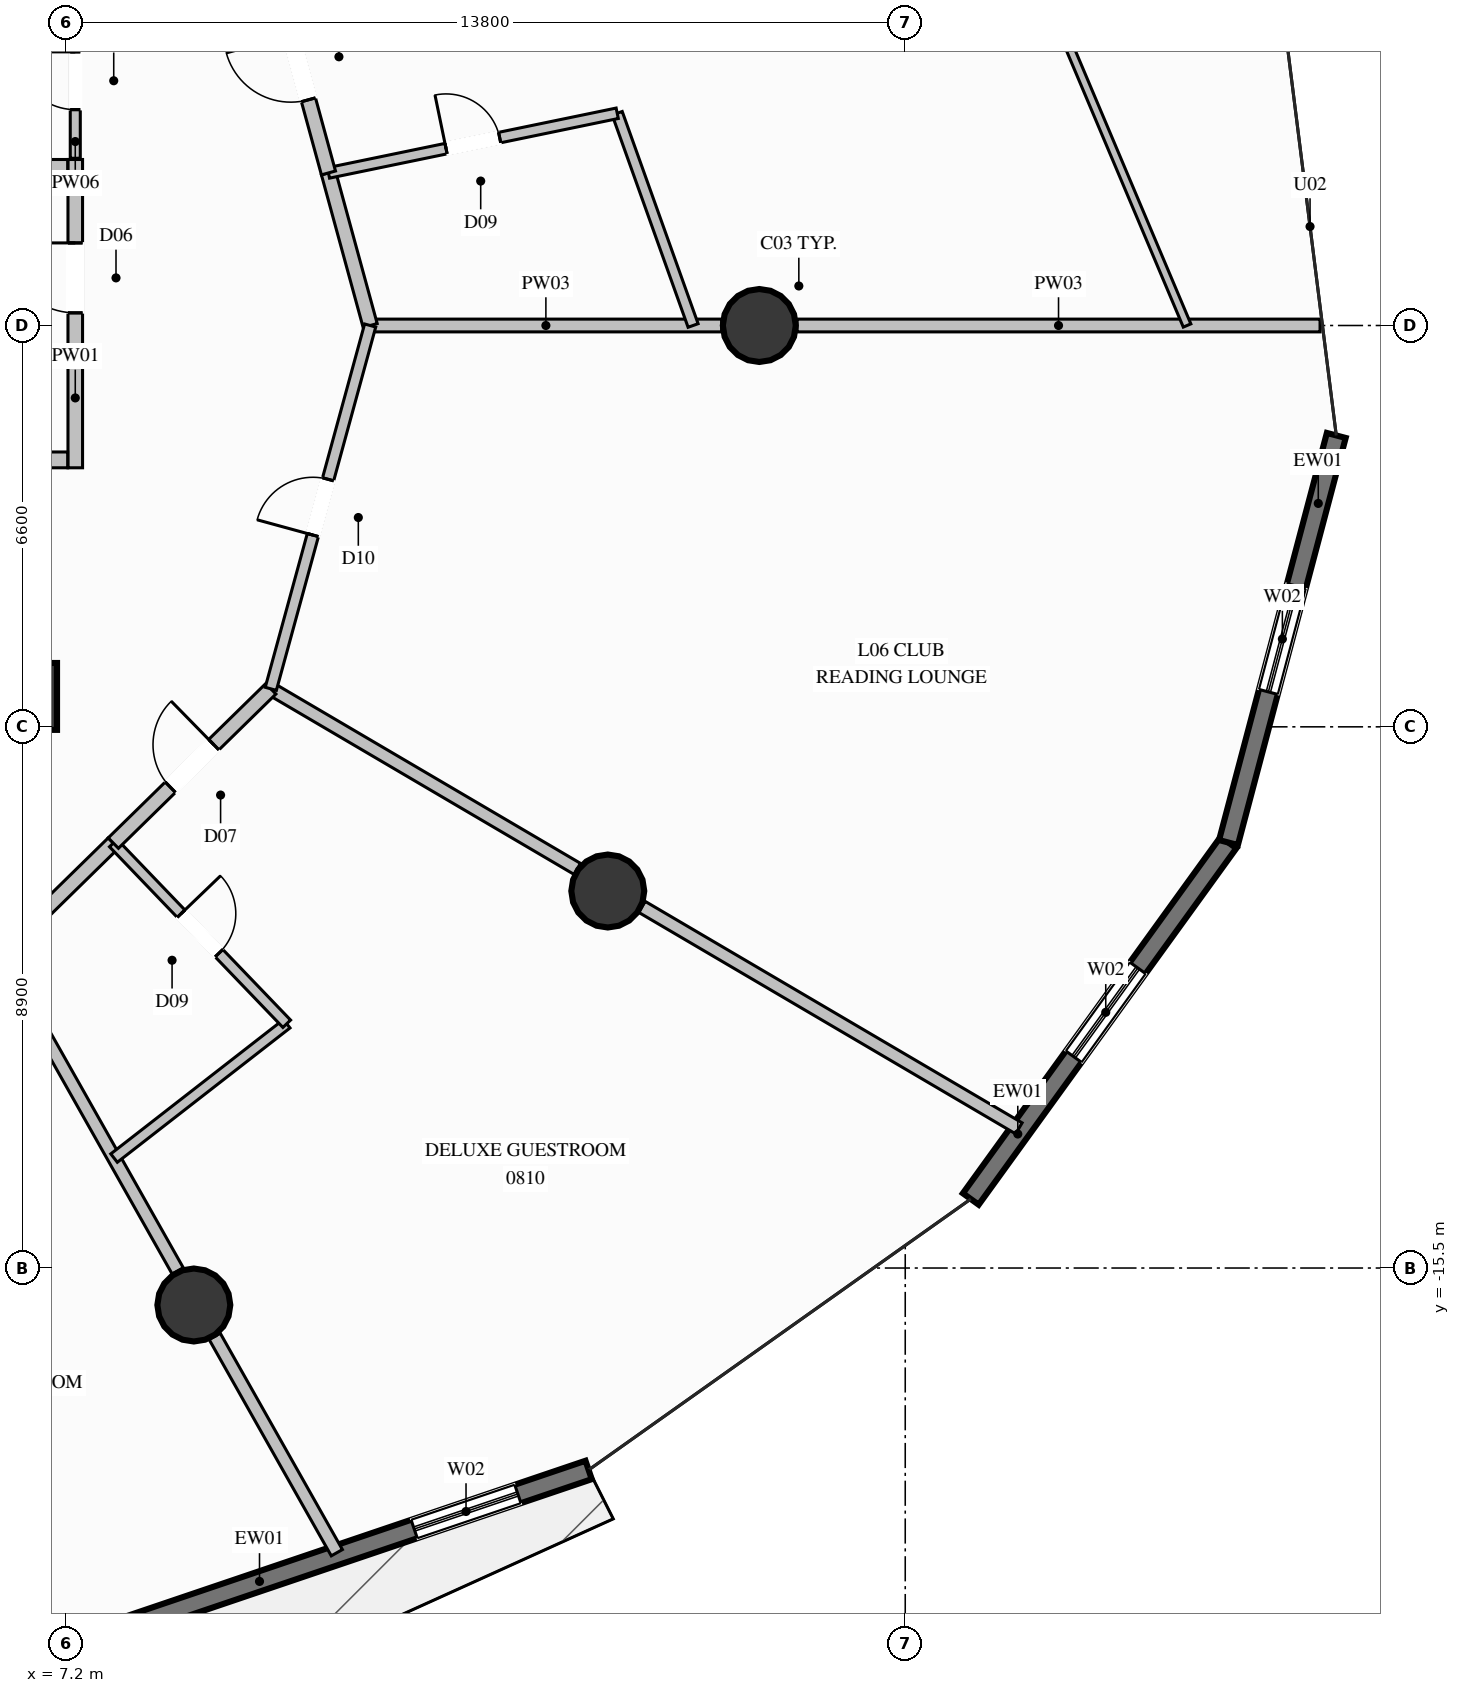
"""IFC4 building model, lengths in metres.
Left out: names, types, materials, properties, quantities, classifications, styles, units other than length and angle.
Written with IfcOpenShell. Run it as: python <this file> out.ifc"""

import sys

from ifc_helpers import new_model, si_unit, direction, frame, frame_2d, origin, origin_2d, place, context, subcontext, project, spatial, rectangle, circle, extrude, element, fill, save


model = new_model("IFC4")
c1 = context("Model", 3, precision=1e-05, world=origin(), true_north=direction((0.0, 1.0)))
c2 = subcontext(c1, "Body", "Model", "MODEL_VIEW")
j1 = project(units=[si_unit("LENGTHUNIT", "METRE"), si_unit("PLANEANGLEUNIT", "RADIAN")], contexts=[c1])
p1 = place(None, origin())
s1 = spatial("IfcSite", under=j1, at=p1, CompositionType="ELEMENT")
p2 = place(p1, origin())
s2 = spatial("IfcBuilding", under=s1, at=p2, CompositionType="ELEMENT")
p3 = place(p2, frame((0.0, 0.0, 32.0)))
s3 = spatial("IfcBuildingStorey", under=s2, at=p3, CompositionType="ELEMENT", Elevation=32.0)
p4 = place(p3, frame((6.5, -6.1, 0.0), z_axis=(0.0, 0.0, 1.0), x_axis=(1.0, 0.0, 0.0)))
e1 = element("IfcColumn", 1, at=p4, inside=s3, PredefinedType="COLUMN", context=c2, shape_type="SweptSolid", body=[
    extrude(rectangle(XDim=1.1, YDim=1.1, at=origin_2d()), origin(), (0.0, 0.0, 1.0), 3.6),
])
for number, where, z_axis, x_axis in (
    (2, (18.6, 0.0, 0.0), (0.0, 0.0, 1.0), (1.0, 0.0, 0.0)),
    (3, (9.3, -16.108, 0.0), (0.0, 0.0, 1.0), (1.0, 0.0, 0.0)),
    (4, (16.108, -9.3, 0.0), (0.0, 0.0, 1.0), (1.0, 0.0, 0.0)),
):
    element("IfcColumn", number, at=place(p3, frame(where, z_axis=z_axis, x_axis=x_axis)), inside=s3, PredefinedType="COLUMN", context=c2, shape_type="SweptSolid", body=[
        extrude(circle(Radius=0.6, at=origin_2d()), origin(), (0.0, 0.0, 1.0), 3.6),
    ])
p5 = place(p3, frame((15.793, -18.821, 0.0), z_axis=(0.0, 0.0, 1.0), x_axis=(-0.94717495877, -0.320717317085, 0.0)))
e5 = element("IfcWall", 5, at=p5, inside=s3, PredefinedType="SOLIDWALL", context=c2, shape_type="SweptSolid", body=[
    extrude(rectangle(XDim=8.151, YDim=0.32, at=frame_2d((4.075, 0.0))), origin(), (0.0, 0.0, 1.0), 3.34),
])
p6 = place(p5, frame((1.229, 0.0, 0.35)))
e6 = element("IfcOpeningElement", 6, at=p6, cuts=e5, PredefinedType="OPENING", context=c2, shape_type="SweptSolid", body=[
    extrude(rectangle(XDim=1.8, YDim=2.6, at=frame_2d((0.9, 1.3))), frame((0.0, 0.17, 0.0), z_axis=(0.0, -1.0, 0.0), x_axis=(1.0, 0.0, 0.0)), (0.0, 0.0, 1.0), 0.34),
])
p7 = place(p3, frame((26.316, -8.503, 0.0), z_axis=(0.0, 0.0, 1.0), x_axis=(-0.585883584877, -0.810395227634, 0.0)))
e7 = element("IfcWall", 7, at=p7, inside=s3, PredefinedType="SOLIDWALL", context=c2, shape_type="SweptSolid", body=[
    extrude(rectangle(XDim=7.234, YDim=0.32, at=frame_2d((3.617, 0.0))), origin(), (0.0, 0.0, 1.0), 3.34),
])
p8 = place(p7, frame((2.545, 0.0, 0.35)))
e8 = element("IfcOpeningElement", 8, at=p8, cuts=e7, PredefinedType="OPENING", context=c2, shape_type="SweptSolid", body=[
    extrude(rectangle(XDim=1.8, YDim=2.6, at=frame_2d((0.9, 1.3))), frame((0.0, 0.17, 0.0), z_axis=(0.0, -1.0, 0.0), x_axis=(1.0, 0.0, 0.0)), (0.0, 0.0, 1.0), 0.34),
])
p9 = place(p3, frame((28.089, -1.808, 0.0), z_axis=(0.0, 0.0, 1.0), x_axis=(-0.256032082016, -0.966668284873, 0.0)))
e9 = element("IfcWall", 9, at=p9, inside=s3, PredefinedType="SOLIDWALL", context=c2, shape_type="SweptSolid", body=[
    extrude(rectangle(XDim=6.926, YDim=0.32, at=frame_2d((3.463, 0.0))), origin(), (0.0, 0.0, 1.0), 3.34),
])
p10 = place(p9, frame((2.563, 0.0, 0.35)))
e10 = element("IfcOpeningElement", 10, at=p10, cuts=e9, PredefinedType="OPENING", context=c2, shape_type="SweptSolid", body=[
    extrude(rectangle(XDim=1.8, YDim=2.6, at=frame_2d((0.9, 1.3))), frame((0.0, 0.17, 0.0), z_axis=(0.0, -1.0, 0.0), x_axis=(1.0, 0.0, 0.0)), (0.0, 0.0, 1.0), 0.34),
])
p11 = place(p3, frame((7.35, -2.34, 0.0), z_axis=(0.0, 0.0, 1.0), x_axis=(0.0, 1.0, 0.0)))
e11 = element("IfcWall", 11, at=p11, inside=s3, PredefinedType="PARTITIONING", context=c2, shape_type="SweptSolid", body=[
    extrude(rectangle(XDim=5.07, YDim=0.24, at=frame_2d((2.535, 0.0))), origin(), (0.0, 0.0, 1.0), 2.425),
])
p12 = place(p11, frame((2.548, 0.0, 0.0)))
e12 = element("IfcOpeningElement", 12, at=p12, cuts=e11, PredefinedType="OPENING", context=c2, shape_type="SweptSolid", body=[
    extrude(rectangle(XDim=1.15, YDim=2.2, at=frame_2d((0.575, 1.1))), frame((0.0, 0.13, 0.0), z_axis=(0.0, -1.0, 0.0), x_axis=(1.0, 0.0, 0.0)), (0.0, 0.0, 1.0), 0.26),
])
p13 = place(p3, frame((6.35, -2.21, 0.0), z_axis=(0.0, 0.0, 1.0), x_axis=(1.0, 0.0, 0.0)))
e13 = element("IfcWall", 13, at=p13, inside=s3, PredefinedType="PARTITIONING", context=c2, shape_type="SweptSolid", body=[
    extrude(rectangle(XDim=0.875, YDim=0.26, at=frame_2d((0.438, 0.0))), origin(), (0.0, 0.0, 1.0), 3.34),
])
p14 = place(p3, frame((4.13, 2.6, 0.0), z_axis=(0.0, 0.0, 1.0), x_axis=(1.0, 0.0, 0.0)))
e14 = element("IfcWall", 14, at=p14, inside=s3, PredefinedType="PARTITIONING", context=c2, shape_type="SweptSolid", body=[
    extrude(rectangle(XDim=3.095, YDim=0.26, at=frame_2d((1.548, 0.0))), origin(), (0.0, 0.0, 1.0), 3.34),
])
p15 = place(p3, frame((7.35, 2.75, 0.0), z_axis=(0.0, 0.0, 1.0), x_axis=(0.0, 1.0, 0.0)))
e15 = element("IfcWall", 15, at=p15, inside=s3, PredefinedType="PARTITIONING", context=c2, shape_type="SweptSolid", body=[
    extrude(rectangle(XDim=2.55, YDim=0.165, at=frame_2d((1.275, 0.0))), origin(), (0.0, 0.0, 1.0), 3.34),
])
p16 = place(p15, frame((0.8, 0.0, 0.0)))
e16 = element("IfcOpeningElement", 16, at=p16, cuts=e15, PredefinedType="OPENING", context=c2, shape_type="SweptSolid", body=[
    extrude(rectangle(XDim=0.95, YDim=2.1, at=frame_2d((0.475, 1.05))), frame((0.0, 0.093, 0.0), z_axis=(0.0, -1.0, 0.0), x_axis=(1.0, 0.0, 0.0)), (0.0, 0.0, 1.0), 0.185),
])
p17 = place(p3, frame((12.2, 0.0, 0.0), z_axis=(0.0, 0.0, 1.0), x_axis=(1.0, 0.0, 0.0)))
e17 = element("IfcWall", 17, at=p17, inside=s3, PredefinedType="PARTITIONING", context=c2, shape_type="SweptSolid", body=[
    extrude(rectangle(XDim=5.78, YDim=0.21, at=frame_2d((2.89, 0.0))), origin(), (0.0, 0.0, 1.0), 2.709),
])
p18 = place(p3, frame((19.22, 0.0, 0.0), z_axis=(0.0, 0.0, 1.0), x_axis=(1.0, 0.0, 0.0)))
e18 = element("IfcWall", 18, at=p18, inside=s3, PredefinedType="PARTITIONING", context=c2, shape_type="SweptSolid", body=[
    extrude(rectangle(XDim=8.602, YDim=0.21, at=frame_2d((4.301, 0.0))), origin(), (0.0, 0.0, 1.0), 3.34),
])
p19 = place(p3, frame((6.1, -10.349, 0.0), z_axis=(0.0, 0.0, 1.0), x_axis=(0.491652896219, -0.870791266401, 0.0)))
e19 = element("IfcWall", 19, at=p19, inside=s3, PredefinedType="PARTITIONING", context=c2, shape_type="SweptSolid", body=[
    extrude(rectangle(XDim=5.969, YDim=0.21, at=frame_2d((2.985, 0.0))), origin(), (0.0, 0.0, 1.0), 2.709),
])
p20 = place(p3, frame((9.643, -16.624, 0.0), z_axis=(0.0, 0.0, 1.0), x_axis=(0.491698874435, -0.87076530528, 0.0)))
e20 = element("IfcWall", 20, at=p20, inside=s3, PredefinedType="PARTITIONING", context=c2, shape_type="SweptSolid", body=[
    extrude(rectangle(XDim=4.086, YDim=0.21, at=frame_2d((2.043, 0.0))), origin(), (0.0, 0.0, 1.0), 3.34),
])
p21 = place(p3, frame((10.566, -5.975, 0.0), z_axis=(0.0, 0.0, 1.0), x_axis=(0.862217531027, -0.506538181374, 0.0)))
e21 = element("IfcWall", 21, at=p21, inside=s3, PredefinedType="PARTITIONING", context=c2, shape_type="SweptSolid", body=[
    extrude(rectangle(XDim=5.845, YDim=0.21, at=frame_2d((2.923, 0.0))), origin(), (0.0, 0.0, 1.0), 2.709),
])
p22 = place(p3, frame((16.67, -9.561, 0.0), z_axis=(0.0, 0.0, 1.0), x_axis=(0.862214298177, -0.506543684215, 0.0)))
e22 = element("IfcWall", 22, at=p22, inside=s3, PredefinedType="PARTITIONING", context=c2, shape_type="SweptSolid", body=[
    extrude(rectangle(XDim=7.19, YDim=0.21, at=frame_2d((3.595, 0.0))), origin(), (0.0, 0.0, 1.0), 3.34),
])
p23 = place(p3, frame((12.2, 0.0, 0.0), z_axis=(0.0, 0.0, 1.0), x_axis=(-0.263744763784, 0.964592504416, 0.0)))
e23 = element("IfcWall", 23, at=p23, inside=s3, PredefinedType="PARTITIONING", context=c2, shape_type="SweptSolid", body=[
    extrude(rectangle(XDim=2.601, YDim=0.24, at=frame_2d((1.301, 0.0))), origin(), (0.0, 0.0, 1.0), 2.919),
])
p24 = place(p3, frame((17.511, 0.0, 0.0), z_axis=(0.0, 0.0, 1.0), x_axis=(-0.336724431673, 0.94160323763, 0.0)))
e24 = element("IfcWall", 24, at=p24, inside=s3, PredefinedType="PLUMBINGWALL", context=c2, shape_type="SweptSolid", body=[
    extrude(rectangle(XDim=3.707, YDim=0.175, at=frame_2d((1.853, 0.0))), origin(), (0.0, 0.0, 1.0), 3.34),
])
p25 = place(p3, frame((11.514, 2.509, 0.0), z_axis=(0.0, 0.0, 1.0), x_axis=(0.979325812174, 0.202289281992, 0.0)))
e25 = element("IfcWall", 25, at=p25, inside=s3, PredefinedType="PLUMBINGWALL", context=c2, shape_type="SweptSolid", body=[
    extrude(rectangle(XDim=4.849, YDim=0.175, at=frame_2d((2.425, 0.0))), origin(), (0.0, 0.0, 1.0), 3.34),
])
p26 = place(p25, frame((1.975, 0.0, 0.0)))
e26 = element("IfcOpeningElement", 26, at=p26, cuts=e25, PredefinedType="OPENING", context=c2, shape_type="SweptSolid", body=[
    extrude(rectangle(XDim=0.9, YDim=2.1, at=frame_2d((0.45, 1.05))), frame((0.0, 0.098, 0.0), z_axis=(0.0, -1.0, 0.0), x_axis=(1.0, 0.0, 0.0)), (0.0, 0.0, 1.0), 0.195),
])
p27 = place(p3, frame((11.514, 2.509, 0.0), z_axis=(0.0, 0.0, 1.0), x_axis=(-0.263818706543, 0.96457228349, 0.0)))
e27 = element("IfcWall", 27, at=p27, inside=s3, PredefinedType="PARTITIONING", context=c2, shape_type="SweptSolid", body=[
    extrude(rectangle(XDim=3.593, YDim=0.24, at=frame_2d((1.797, 0.0))), origin(), (0.0, 0.0, 1.0), 2.919),
])
p28 = place(p27, frame((1.247, 0.0, 0.0)))
e28 = element("IfcOpeningElement", 28, at=p28, cuts=e27, PredefinedType="OPENING", context=c2, shape_type="SweptSolid", body=[
    extrude(rectangle(XDim=1.1, YDim=2.3, at=frame_2d((0.55, 1.15))), frame((0.0, 0.13, 0.0), z_axis=(0.0, -1.0, 0.0), x_axis=(1.0, 0.0, 0.0)), (0.0, 0.0, 1.0), 0.26),
])
p29 = place(p3, frame((25.635, 0.0, 0.0), z_axis=(0.0, 0.0, 1.0), x_axis=(-0.389280036571, 0.921119456491, 0.0)))
e29 = element("IfcWall", 29, at=p29, inside=s3, PredefinedType="PARTITIONING", context=c2, shape_type="SweptSolid", body=[
    extrude(rectangle(XDim=12.901, YDim=0.135, at=frame_2d((6.45, 0.0))), origin(), (0.0, 0.0, 1.0), 3.34),
])
p30 = place(p29, frame((5.975, 0.0, 0.0)))
e30 = element("IfcOpeningElement", 30, at=p30, cuts=e29, PredefinedType="OPENING", context=c2, shape_type="SweptSolid", body=[
    extrude(rectangle(XDim=0.95, YDim=2.1, at=frame_2d((0.475, 1.05))), frame((0.0, 0.078, 0.0), z_axis=(0.0, -1.0, 0.0), x_axis=(1.0, 0.0, 0.0)), (0.0, 0.0, 1.0), 0.155),
])
p31 = place(p3, frame((6.1, -10.349, 0.0), z_axis=(0.0, 0.0, 1.0), x_axis=(0.714460071513, 0.69967621527, 0.0)))
e31 = element("IfcWall", 31, at=p31, inside=s3, PredefinedType="PARTITIONING", context=c2, shape_type="SweptSolid", body=[
    extrude(rectangle(XDim=2.626, YDim=0.24, at=frame_2d((1.313, 0.0))), origin(), (0.0, 0.0, 1.0), 3.34),
])
p32 = place(p3, frame((7.988, -13.692, 0.0), z_axis=(0.0, 0.0, 1.0), x_axis=(0.78932298539, 0.613978195651, 0.0)))
e32 = element("IfcWall", 32, at=p32, inside=s3, PredefinedType="PLUMBINGWALL", context=c2, shape_type="SweptSolid", body=[
    extrude(rectangle(XDim=3.598, YDim=0.175, at=frame_2d((1.799, 0.0))), origin(), (0.0, 0.0, 1.0), 3.34),
])
p33 = place(p3, frame((7.976, -8.512, 0.0), z_axis=(0.0, 0.0, 1.0), x_axis=(0.692493571669, -0.721424045342, 0.0)))
e33 = element("IfcWall", 33, at=p33, inside=s3, PredefinedType="PLUMBINGWALL", context=c2, shape_type="SweptSolid", body=[
    extrude(rectangle(XDim=4.118, YDim=0.175, at=frame_2d((2.059, 0.0))), origin(), (0.0, 0.0, 1.0), 3.34),
])
p34 = place(p33, frame((1.609, 0.0, 0.0)))
e34 = element("IfcOpeningElement", 34, at=p34, cuts=e33, PredefinedType="OPENING", context=c2, shape_type="SweptSolid", body=[
    extrude(rectangle(XDim=0.9, YDim=2.1, at=frame_2d((0.45, 1.05))), frame((0.0, 0.098, 0.0), z_axis=(0.0, -1.0, 0.0), x_axis=(1.0, 0.0, 0.0)), (0.0, 0.0, 1.0), 0.195),
])
p35 = place(p3, frame((7.976, -8.512, 0.0), z_axis=(0.0, 0.0, 1.0), x_axis=(0.714375756875, 0.699762301064, 0.0)))
e35 = element("IfcWall", 35, at=p35, inside=s3, PredefinedType="PARTITIONING", context=c2, shape_type="SweptSolid", body=[
    extrude(rectangle(XDim=3.625, YDim=0.24, at=frame_2d((1.812, 0.0))), origin(), (0.0, 0.0, 1.0), 3.34),
])
p36 = place(p35, frame((1.313, 0.0, 0.0)))
e36 = element("IfcOpeningElement", 36, at=p36, cuts=e35, PredefinedType="OPENING", context=c2, shape_type="SweptSolid", body=[
    extrude(rectangle(XDim=1.0, YDim=2.2, at=frame_2d((0.5, 1.1))), frame((0.0, 0.13, 0.0), z_axis=(0.0, -1.0, 0.0), x_axis=(1.0, 0.0, 0.0)), (0.0, 0.0, 1.0), 0.26),
])
p37 = place(p3, frame((10.566, -5.975, 0.0), z_axis=(0.0, 0.0, 1.0), x_axis=(0.263787657435, 0.964580775148, 0.0)))
e37 = element("IfcWall", 37, at=p37, inside=s3, PredefinedType="PARTITIONING", context=c2, shape_type="SweptSolid", body=[
    extrude(rectangle(XDim=6.195, YDim=0.19, at=frame_2d((3.097, 0.0))), origin(), (0.0, 0.0, 1.0), 2.919),
])
p38 = place(p37, frame((2.622, 0.0, 0.0)))
e38 = element("IfcOpeningElement", 38, at=p38, cuts=e37, PredefinedType="OPENING", context=c2, shape_type="SweptSolid", body=[
    extrude(rectangle(XDim=0.95, YDim=2.1, at=frame_2d((0.475, 1.05))), frame((0.0, 0.105, 0.0), z_axis=(0.0, -1.0, 0.0), x_axis=(1.0, 0.0, 0.0)), (0.0, 0.0, 1.0), 0.21),
])
p39 = place(p6, origin())
e39 = element("IfcWindow", 39, at=p39, inside=s3, PartitioningType="SINGLE_PANEL", PredefinedType="WINDOW", context=c2, shape_type="SweptSolid", body=[
    extrude(rectangle(XDim=1.8, YDim=2.6, at=frame_2d((0.9, 1.3))), frame((0.0, 0.03, 0.0), z_axis=(0.0, -1.0, 0.0), x_axis=(1.0, 0.0, 0.0)), (0.0, 0.0, 1.0), 0.06),
])
fill(e6, e39)
p40 = place(p8, origin())
e40 = element("IfcWindow", 40, at=p40, inside=s3, PartitioningType="SINGLE_PANEL", PredefinedType="WINDOW", context=c2, shape_type="SweptSolid", body=[
    extrude(rectangle(XDim=1.8, YDim=2.6, at=frame_2d((0.9, 1.3))), frame((0.0, 0.03, 0.0), z_axis=(0.0, -1.0, 0.0), x_axis=(1.0, 0.0, 0.0)), (0.0, 0.0, 1.0), 0.06),
])
fill(e8, e40)
p41 = place(p10, origin())
e41 = element("IfcWindow", 41, at=p41, inside=s3, PartitioningType="SINGLE_PANEL", PredefinedType="WINDOW", context=c2, shape_type="SweptSolid", body=[
    extrude(rectangle(XDim=1.8, YDim=2.6, at=frame_2d((0.9, 1.3))), frame((0.0, 0.03, 0.0), z_axis=(0.0, -1.0, 0.0), x_axis=(1.0, 0.0, 0.0)), (0.0, 0.0, 1.0), 0.06),
])
fill(e10, e41)
p42 = place(p12, origin())
e42 = element("IfcDoor", 42, at=p42, inside=s3, OperationType="SINGLE_SWING_RIGHT", PredefinedType="DOOR", context=c2, shape_type="SweptSolid", body=[
    extrude(rectangle(XDim=1.15, YDim=2.2, at=frame_2d((0.575, 1.1))), frame((0.0, 0.025, 0.0), z_axis=(0.0, -1.0, 0.0), x_axis=(1.0, 0.0, 0.0)), (0.0, 0.0, 1.0), 0.05),
])
fill(e12, e42)
p43 = place(p16, origin())
e43 = element("IfcDoor", 43, at=p43, inside=s3, OperationType="SINGLE_SWING_RIGHT", PredefinedType="DOOR", context=c2, shape_type="SweptSolid", body=[
    extrude(rectangle(XDim=0.95, YDim=2.1, at=frame_2d((0.475, 1.05))), frame((0.0, 0.025, 0.0), z_axis=(0.0, -1.0, 0.0), x_axis=(1.0, 0.0, 0.0)), (0.0, 0.0, 1.0), 0.05),
])
fill(e16, e43)
p44 = place(p26, origin())
e44 = element("IfcDoor", 44, at=p44, inside=s3, OperationType="SINGLE_SWING_LEFT", PredefinedType="DOOR", context=c2, shape_type="SweptSolid", body=[
    extrude(rectangle(XDim=0.9, YDim=2.1, at=frame_2d((0.45, 1.05))), frame((0.0, 0.025, 0.0), z_axis=(0.0, -1.0, 0.0), x_axis=(1.0, 0.0, 0.0)), (0.0, 0.0, 1.0), 0.05),
])
fill(e26, e44)
p45 = place(p28, origin())
e45 = element("IfcDoor", 45, at=p45, inside=s3, OperationType="SINGLE_SWING_RIGHT", PredefinedType="DOOR", context=c2, shape_type="SweptSolid", body=[
    extrude(rectangle(XDim=1.1, YDim=2.3, at=frame_2d((0.55, 1.15))), frame((0.0, 0.025, 0.0), z_axis=(0.0, -1.0, 0.0), x_axis=(1.0, 0.0, 0.0)), (0.0, 0.0, 1.0), 0.05),
])
fill(e28, e45)
p46 = place(p34, origin())
e46 = element("IfcDoor", 46, at=p46, inside=s3, OperationType="SINGLE_SWING_LEFT", PredefinedType="DOOR", context=c2, shape_type="SweptSolid", body=[
    extrude(rectangle(XDim=0.9, YDim=2.1, at=frame_2d((0.45, 1.05))), frame((0.0, 0.025, 0.0), z_axis=(0.0, -1.0, 0.0), x_axis=(1.0, 0.0, 0.0)), (0.0, 0.0, 1.0), 0.05),
])
fill(e34, e46)
p47 = place(p36, origin())
e47 = element("IfcDoor", 47, at=p47, inside=s3, OperationType="SINGLE_SWING_RIGHT", PredefinedType="DOOR", context=c2, shape_type="SweptSolid", body=[
    extrude(rectangle(XDim=1.0, YDim=2.2, at=frame_2d((0.5, 1.1))), frame((0.0, 0.025, 0.0), z_axis=(0.0, -1.0, 0.0), x_axis=(1.0, 0.0, 0.0)), (0.0, 0.0, 1.0), 0.05),
])
fill(e36, e47)
p48 = place(p38, origin())
e48 = element("IfcDoor", 48, at=p48, inside=s3, OperationType="SINGLE_SWING_LEFT", PredefinedType="DOOR", context=c2, shape_type="SweptSolid", body=[
    extrude(rectangle(XDim=0.95, YDim=2.1, at=frame_2d((0.475, 1.05))), frame((0.0, 0.025, 0.0), z_axis=(0.0, -1.0, 0.0), x_axis=(1.0, 0.0, 0.0)), (0.0, 0.0, 1.0), 0.05),
])
fill(e38, e48)
save(model, sys.argv[1])
